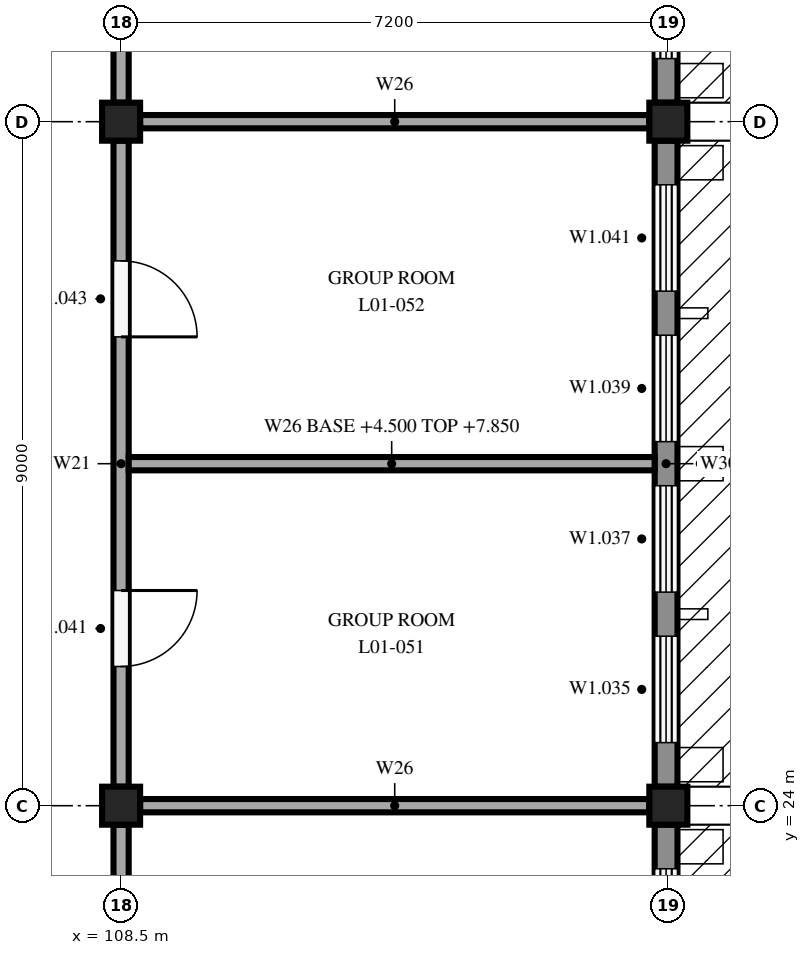
"""IFC4 building model, lengths in metres.
Left out: names, types, materials, properties, quantities, classifications, styles, units other than length and angle.
Written with IfcOpenShell. Run it as: python <this file> out.ifc"""

import sys

from ifc_helpers import new_model, si_unit, direction, frame, frame_2d, origin, origin_2d, place, context, subcontext, project, spatial, rectangle, extrude, element, fill, save


model = new_model("IFC4")
c1 = context("Model", 3, precision=1e-05, world=origin(), true_north=direction((0.0, 1.0)))
c2 = subcontext(c1, "Body", "Model", "MODEL_VIEW")
j1 = project(units=[si_unit("LENGTHUNIT", "METRE"), si_unit("PLANEANGLEUNIT", "RADIAN")], contexts=[c1])
p1 = place(None, origin())
s1 = spatial("IfcSite", under=j1, at=p1, CompositionType="ELEMENT")
p2 = place(p1, origin())
s2 = spatial("IfcBuilding", under=s1, at=p2, CompositionType="ELEMENT")
p3 = place(p2, frame((0.0, 0.0, 4.5)))
s3 = spatial("IfcBuildingStorey", under=s2, at=p3, CompositionType="ELEMENT", Elevation=4.5)
for number, where, z_axis, x_axis in (
    (1, (108.5, 24.0, 0.0), (0.0, 0.0, 1.0), (1.0, 0.0, 0.0)),
    (2, (108.5, 33.0, 0.0), (0.0, 0.0, 1.0), (1.0, 0.0, 0.0)),
    (3, (115.7, 24.0, 0.0), (0.0, 0.0, 1.0), (1.0, 0.0, 0.0)),
    (4, (115.7, 33.0, 0.0), (0.0, 0.0, 1.0), (1.0, 0.0, 0.0)),
):
    element("IfcColumn", number, at=place(p3, frame(where, z_axis=z_axis, x_axis=x_axis)), inside=s3, PredefinedType="COLUMN", context=c2, shape_type="SweptSolid", body=[
        extrude(rectangle(XDim=0.5, YDim=0.5, at=origin_2d()), origin(), (0.0, 0.0, 1.0), 3.35),
    ])
p4 = place(p3, frame((115.67, 23.75, 0.0), z_axis=(0.0, 0.0, 1.0), x_axis=(0.0, -1.0, 0.0)))
e5 = element("IfcWall", 5, at=p4, inside=s3, PredefinedType="STANDARD", context=c2, shape_type="SweptSolid", body=[
    extrude(rectangle(XDim=8.5, YDim=0.3, at=frame_2d((4.25, 0.0))), origin(), (0.0, 0.0, 1.0), 2.85),
])
p5 = place(p4, frame((6.52, 0.0, 0.6)))
e6 = element("IfcOpeningElement", 6, at=p5, cuts=e5, PredefinedType="OPENING", context=c2, shape_type="SweptSolid", body=[
    extrude(rectangle(XDim=1.4, YDim=2.2, at=frame_2d((0.7, 1.1))), frame((0.0, 0.16, 0.0), z_axis=(0.0, -1.0, 0.0), x_axis=(1.0, 0.0, 0.0)), (0.0, 0.0, 1.0), 0.32),
])
p6 = place(p4, frame((4.54, 0.0, 0.6)))
e7 = element("IfcOpeningElement", 7, at=p6, cuts=e5, PredefinedType="OPENING", context=c2, shape_type="SweptSolid", body=[
    extrude(rectangle(XDim=1.4, YDim=2.2, at=frame_2d((0.7, 1.1))), frame((0.0, 0.16, 0.0), z_axis=(0.0, -1.0, 0.0), x_axis=(1.0, 0.0, 0.0)), (0.0, 0.0, 1.0), 0.32),
])
p7 = place(p4, frame((2.56, 0.0, 0.6)))
e8 = element("IfcOpeningElement", 8, at=p7, cuts=e5, PredefinedType="OPENING", context=c2, shape_type="SweptSolid", body=[
    extrude(rectangle(XDim=1.4, YDim=2.2, at=frame_2d((0.7, 1.1))), frame((0.0, 0.16, 0.0), z_axis=(0.0, -1.0, 0.0), x_axis=(1.0, 0.0, 0.0)), (0.0, 0.0, 1.0), 0.32),
])
p8 = place(p4, frame((0.58, 0.0, 0.6)))
e9 = element("IfcOpeningElement", 9, at=p8, cuts=e5, PredefinedType="OPENING", context=c2, shape_type="SweptSolid", body=[
    extrude(rectangle(XDim=1.4, YDim=2.2, at=frame_2d((0.7, 1.1))), frame((0.0, 0.16, 0.0), z_axis=(0.0, -1.0, 0.0), x_axis=(1.0, 0.0, 0.0)), (0.0, 0.0, 1.0), 0.32),
])
p9 = place(p3, frame((115.67, 32.75, 0.0), z_axis=(0.0, 0.0, 1.0), x_axis=(0.0, -1.0, 0.0)))
e10 = element("IfcWall", 10, at=p9, inside=s3, PredefinedType="STANDARD", context=c2, shape_type="SweptSolid", body=[
    extrude(rectangle(XDim=8.5, YDim=0.3, at=frame_2d((4.25, 0.0))), origin(), (0.0, 0.0, 1.0), 2.85),
])
p10 = place(p9, frame((6.52, 0.0, 0.6)))
e11 = element("IfcOpeningElement", 11, at=p10, cuts=e10, PredefinedType="OPENING", context=c2, shape_type="SweptSolid", body=[
    extrude(rectangle(XDim=1.4, YDim=2.2, at=frame_2d((0.7, 1.1))), frame((0.0, 0.16, 0.0), z_axis=(0.0, -1.0, 0.0), x_axis=(1.0, 0.0, 0.0)), (0.0, 0.0, 1.0), 0.32),
])
p11 = place(p9, frame((4.54, 0.0, 0.6)))
e12 = element("IfcOpeningElement", 12, at=p11, cuts=e10, PredefinedType="OPENING", context=c2, shape_type="SweptSolid", body=[
    extrude(rectangle(XDim=1.4, YDim=2.2, at=frame_2d((0.7, 1.1))), frame((0.0, 0.16, 0.0), z_axis=(0.0, -1.0, 0.0), x_axis=(1.0, 0.0, 0.0)), (0.0, 0.0, 1.0), 0.32),
])
p12 = place(p9, frame((2.56, 0.0, 0.6)))
e13 = element("IfcOpeningElement", 13, at=p12, cuts=e10, PredefinedType="OPENING", context=c2, shape_type="SweptSolid", body=[
    extrude(rectangle(XDim=1.4, YDim=2.2, at=frame_2d((0.7, 1.1))), frame((0.0, 0.16, 0.0), z_axis=(0.0, -1.0, 0.0), x_axis=(1.0, 0.0, 0.0)), (0.0, 0.0, 1.0), 0.32),
])
p13 = place(p9, frame((0.58, 0.0, 0.6)))
e14 = element("IfcOpeningElement", 14, at=p13, cuts=e10, PredefinedType="OPENING", context=c2, shape_type="SweptSolid", body=[
    extrude(rectangle(XDim=1.4, YDim=2.2, at=frame_2d((0.7, 1.1))), frame((0.0, 0.16, 0.0), z_axis=(0.0, -1.0, 0.0), x_axis=(1.0, 0.0, 0.0)), (0.0, 0.0, 1.0), 0.32),
])
p14 = place(p3, frame((115.67, 41.75, 0.0), z_axis=(0.0, 0.0, 1.0), x_axis=(0.0, -1.0, 0.0)))
e15 = element("IfcWall", 15, at=p14, inside=s3, PredefinedType="STANDARD", context=c2, shape_type="SweptSolid", body=[
    extrude(rectangle(XDim=8.5, YDim=0.3, at=frame_2d((4.25, 0.0))), origin(), (0.0, 0.0, 1.0), 2.85),
])
p15 = place(p14, frame((6.52, 0.0, 0.6)))
e16 = element("IfcOpeningElement", 16, at=p15, cuts=e15, PredefinedType="OPENING", context=c2, shape_type="SweptSolid", body=[
    extrude(rectangle(XDim=1.4, YDim=2.2, at=frame_2d((0.7, 1.1))), frame((0.0, 0.16, 0.0), z_axis=(0.0, -1.0, 0.0), x_axis=(1.0, 0.0, 0.0)), (0.0, 0.0, 1.0), 0.32),
])
p16 = place(p14, frame((4.54, 0.0, 0.6)))
e17 = element("IfcOpeningElement", 17, at=p16, cuts=e15, PredefinedType="OPENING", context=c2, shape_type="SweptSolid", body=[
    extrude(rectangle(XDim=1.4, YDim=2.2, at=frame_2d((0.7, 1.1))), frame((0.0, 0.16, 0.0), z_axis=(0.0, -1.0, 0.0), x_axis=(1.0, 0.0, 0.0)), (0.0, 0.0, 1.0), 0.32),
])
p17 = place(p14, frame((2.56, 0.0, 0.6)))
e18 = element("IfcOpeningElement", 18, at=p17, cuts=e15, PredefinedType="OPENING", context=c2, shape_type="SweptSolid", body=[
    extrude(rectangle(XDim=1.4, YDim=2.2, at=frame_2d((0.7, 1.1))), frame((0.0, 0.16, 0.0), z_axis=(0.0, -1.0, 0.0), x_axis=(1.0, 0.0, 0.0)), (0.0, 0.0, 1.0), 0.32),
])
p18 = place(p14, frame((0.58, 0.0, 0.6)))
e19 = element("IfcOpeningElement", 19, at=p18, cuts=e15, PredefinedType="OPENING", context=c2, shape_type="SweptSolid", body=[
    extrude(rectangle(XDim=1.4, YDim=2.2, at=frame_2d((0.7, 1.1))), frame((0.0, 0.16, 0.0), z_axis=(0.0, -1.0, 0.0), x_axis=(1.0, 0.0, 0.0)), (0.0, 0.0, 1.0), 0.32),
])
p19 = place(p3, frame((108.5, 23.75, 0.0), z_axis=(0.0, 0.0, 1.0), x_axis=(0.0, -1.0, 0.0)))
e20 = element("IfcWall", 20, at=p19, inside=s3, PredefinedType="PARTITIONING", context=c2, shape_type="SweptSolid", body=[
    extrude(rectangle(XDim=8.5, YDim=0.2, at=frame_2d((4.25, 0.0))), origin(), (0.0, 0.0, 1.0), 2.9),
])
p20 = place(p19, frame((3.75, 0.0, 0.0)))
e21 = element("IfcOpeningElement", 21, at=p20, cuts=e20, PredefinedType="OPENING", context=c2, shape_type="SweptSolid", body=[
    extrude(rectangle(XDim=1.0, YDim=2.1, at=frame_2d((0.5, 1.05))), frame((0.0, 0.11, 0.0), z_axis=(0.0, -1.0, 0.0), x_axis=(1.0, 0.0, 0.0)), (0.0, 0.0, 1.0), 0.22),
])
p21 = place(p3, frame((108.5, 32.75, 0.0), z_axis=(0.0, 0.0, 1.0), x_axis=(0.0, -1.0, 0.0)))
e22 = element("IfcWall", 22, at=p21, inside=s3, PredefinedType="PARTITIONING", context=c2, shape_type="SweptSolid", body=[
    extrude(rectangle(XDim=8.5, YDim=0.2, at=frame_2d((4.25, 0.0))), origin(), (0.0, 0.0, 1.0), 2.9),
])
p22 = place(p21, frame((5.919, 0.0, 0.0)))
e23 = element("IfcOpeningElement", 23, at=p22, cuts=e22, PredefinedType="OPENING", context=c2, shape_type="SweptSolid", body=[
    extrude(rectangle(XDim=1.0, YDim=2.1, at=frame_2d((0.5, 1.05))), frame((0.0, 0.11, 0.0), z_axis=(0.0, -1.0, 0.0), x_axis=(1.0, 0.0, 0.0)), (0.0, 0.0, 1.0), 0.22),
])
p23 = place(p21, frame((1.581, 0.0, 0.0)))
e24 = element("IfcOpeningElement", 24, at=p23, cuts=e22, PredefinedType="OPENING", context=c2, shape_type="SweptSolid", body=[
    extrude(rectangle(XDim=1.0, YDim=2.1, at=frame_2d((0.5, 1.05))), frame((0.0, 0.11, 0.0), z_axis=(0.0, -1.0, 0.0), x_axis=(1.0, 0.0, 0.0)), (0.0, 0.0, 1.0), 0.22),
])
p24 = place(p3, frame((108.5, 41.75, 0.0), z_axis=(0.0, 0.0, 1.0), x_axis=(0.0, -1.0, 0.0)))
e25 = element("IfcWall", 25, at=p24, inside=s3, PredefinedType="PARTITIONING", context=c2, shape_type="SweptSolid", body=[
    extrude(rectangle(XDim=8.5, YDim=0.2, at=frame_2d((4.25, 0.0))), origin(), (0.0, 0.0, 1.0), 2.9),
])
p25 = place(p24, frame((3.75, 0.0, 0.0)))
e26 = element("IfcOpeningElement", 26, at=p25, cuts=e25, PredefinedType="OPENING", context=c2, shape_type="SweptSolid", body=[
    extrude(rectangle(XDim=1.0, YDim=2.1, at=frame_2d((0.5, 1.05))), frame((0.0, 0.11, 0.0), z_axis=(0.0, -1.0, 0.0), x_axis=(1.0, 0.0, 0.0)), (0.0, 0.0, 1.0), 0.22),
])
p26 = place(p3, frame((108.75, 24.0, 0.0), z_axis=(0.0, 0.0, 1.0), x_axis=(1.0, 0.0, 0.0)))
e27 = element("IfcWall", 27, at=p26, inside=s3, PredefinedType="PARTITIONING", context=c2, shape_type="SweptSolid", body=[
    extrude(rectangle(XDim=6.7, YDim=0.175, at=frame_2d((3.35, 0.0))), origin(), (0.0, 0.0, 1.0), 2.9),
])
p27 = place(p3, frame((108.6, 28.5, 0.0), z_axis=(0.0, 0.0, 1.0), x_axis=(1.0, 0.0, 0.0)))
e28 = element("IfcWall", 28, at=p27, inside=s3, PredefinedType="PARTITIONING", context=c2, shape_type="SweptSolid", body=[
    extrude(rectangle(XDim=6.92, YDim=0.175, at=frame_2d((3.46, 0.0))), origin(), (0.0, 0.0, 1.0), 3.35),
])
p28 = place(p3, frame((108.75, 33.0, 0.0), z_axis=(0.0, 0.0, 1.0), x_axis=(1.0, 0.0, 0.0)))
e29 = element("IfcWall", 29, at=p28, inside=s3, PredefinedType="PARTITIONING", context=c2, shape_type="SweptSolid", body=[
    extrude(rectangle(XDim=6.7, YDim=0.175, at=frame_2d((3.35, 0.0))), origin(), (0.0, 0.0, 1.0), 2.9),
])
p29 = place(p8, origin())
e30 = element("IfcWindow", 30, at=p29, inside=s3, PartitioningType="DOUBLE_PANEL_VERTICAL", PredefinedType="WINDOW", context=c2, shape_type="SweptSolid", body=[
    extrude(rectangle(XDim=1.4, YDim=2.2, at=frame_2d((0.7, 1.1))), frame((0.0, 0.03, 0.0), z_axis=(0.0, -1.0, 0.0), x_axis=(1.0, 0.0, 0.0)), (0.0, 0.0, 1.0), 0.06),
])
fill(e9, e30)
p30 = place(p10, origin())
e31 = element("IfcWindow", 31, at=p30, inside=s3, PartitioningType="DOUBLE_PANEL_VERTICAL", PredefinedType="WINDOW", context=c2, shape_type="SweptSolid", body=[
    extrude(rectangle(XDim=1.4, YDim=2.2, at=frame_2d((0.7, 1.1))), frame((0.0, 0.03, 0.0), z_axis=(0.0, -1.0, 0.0), x_axis=(1.0, 0.0, 0.0)), (0.0, 0.0, 1.0), 0.06),
])
fill(e11, e31)
p31 = place(p11, origin())
e32 = element("IfcWindow", 32, at=p31, inside=s3, PartitioningType="DOUBLE_PANEL_VERTICAL", PredefinedType="WINDOW", context=c2, shape_type="SweptSolid", body=[
    extrude(rectangle(XDim=1.4, YDim=2.2, at=frame_2d((0.7, 1.1))), frame((0.0, 0.03, 0.0), z_axis=(0.0, -1.0, 0.0), x_axis=(1.0, 0.0, 0.0)), (0.0, 0.0, 1.0), 0.06),
])
fill(e12, e32)
p32 = place(p12, origin())
e33 = element("IfcWindow", 33, at=p32, inside=s3, PartitioningType="DOUBLE_PANEL_VERTICAL", PredefinedType="WINDOW", context=c2, shape_type="SweptSolid", body=[
    extrude(rectangle(XDim=1.4, YDim=2.2, at=frame_2d((0.7, 1.1))), frame((0.0, 0.03, 0.0), z_axis=(0.0, -1.0, 0.0), x_axis=(1.0, 0.0, 0.0)), (0.0, 0.0, 1.0), 0.06),
])
fill(e13, e33)
p33 = place(p13, origin())
e34 = element("IfcWindow", 34, at=p33, inside=s3, PartitioningType="DOUBLE_PANEL_VERTICAL", PredefinedType="WINDOW", context=c2, shape_type="SweptSolid", body=[
    extrude(rectangle(XDim=1.4, YDim=2.2, at=frame_2d((0.7, 1.1))), frame((0.0, 0.03, 0.0), z_axis=(0.0, -1.0, 0.0), x_axis=(1.0, 0.0, 0.0)), (0.0, 0.0, 1.0), 0.06),
])
fill(e14, e34)
p34 = place(p15, origin())
e35 = element("IfcWindow", 35, at=p34, inside=s3, PartitioningType="DOUBLE_PANEL_VERTICAL", PredefinedType="WINDOW", context=c2, shape_type="SweptSolid", body=[
    extrude(rectangle(XDim=1.4, YDim=2.2, at=frame_2d((0.7, 1.1))), frame((0.0, 0.03, 0.0), z_axis=(0.0, -1.0, 0.0), x_axis=(1.0, 0.0, 0.0)), (0.0, 0.0, 1.0), 0.06),
])
fill(e16, e35)
p35 = place(p22, origin())
e36 = element("IfcDoor", 36, at=p35, inside=s3, OperationType="SINGLE_SWING_LEFT", PredefinedType="DOOR", context=c2, shape_type="SweptSolid", body=[
    extrude(rectangle(XDim=1.0, YDim=2.1, at=frame_2d((0.5, 1.05))), frame((0.0, 0.025, 0.0), z_axis=(0.0, -1.0, 0.0), x_axis=(1.0, 0.0, 0.0)), (0.0, 0.0, 1.0), 0.05),
])
fill(e23, e36)
p36 = place(p23, origin())
e37 = element("IfcDoor", 37, at=p36, inside=s3, OperationType="SINGLE_SWING_RIGHT", PredefinedType="DOOR", context=c2, shape_type="SweptSolid", body=[
    extrude(rectangle(XDim=1.0, YDim=2.1, at=frame_2d((0.5, 1.05))), frame((0.0, 0.025, 0.0), z_axis=(0.0, -1.0, 0.0), x_axis=(1.0, 0.0, 0.0)), (0.0, 0.0, 1.0), 0.05),
])
fill(e24, e37)
save(model, sys.argv[1])
